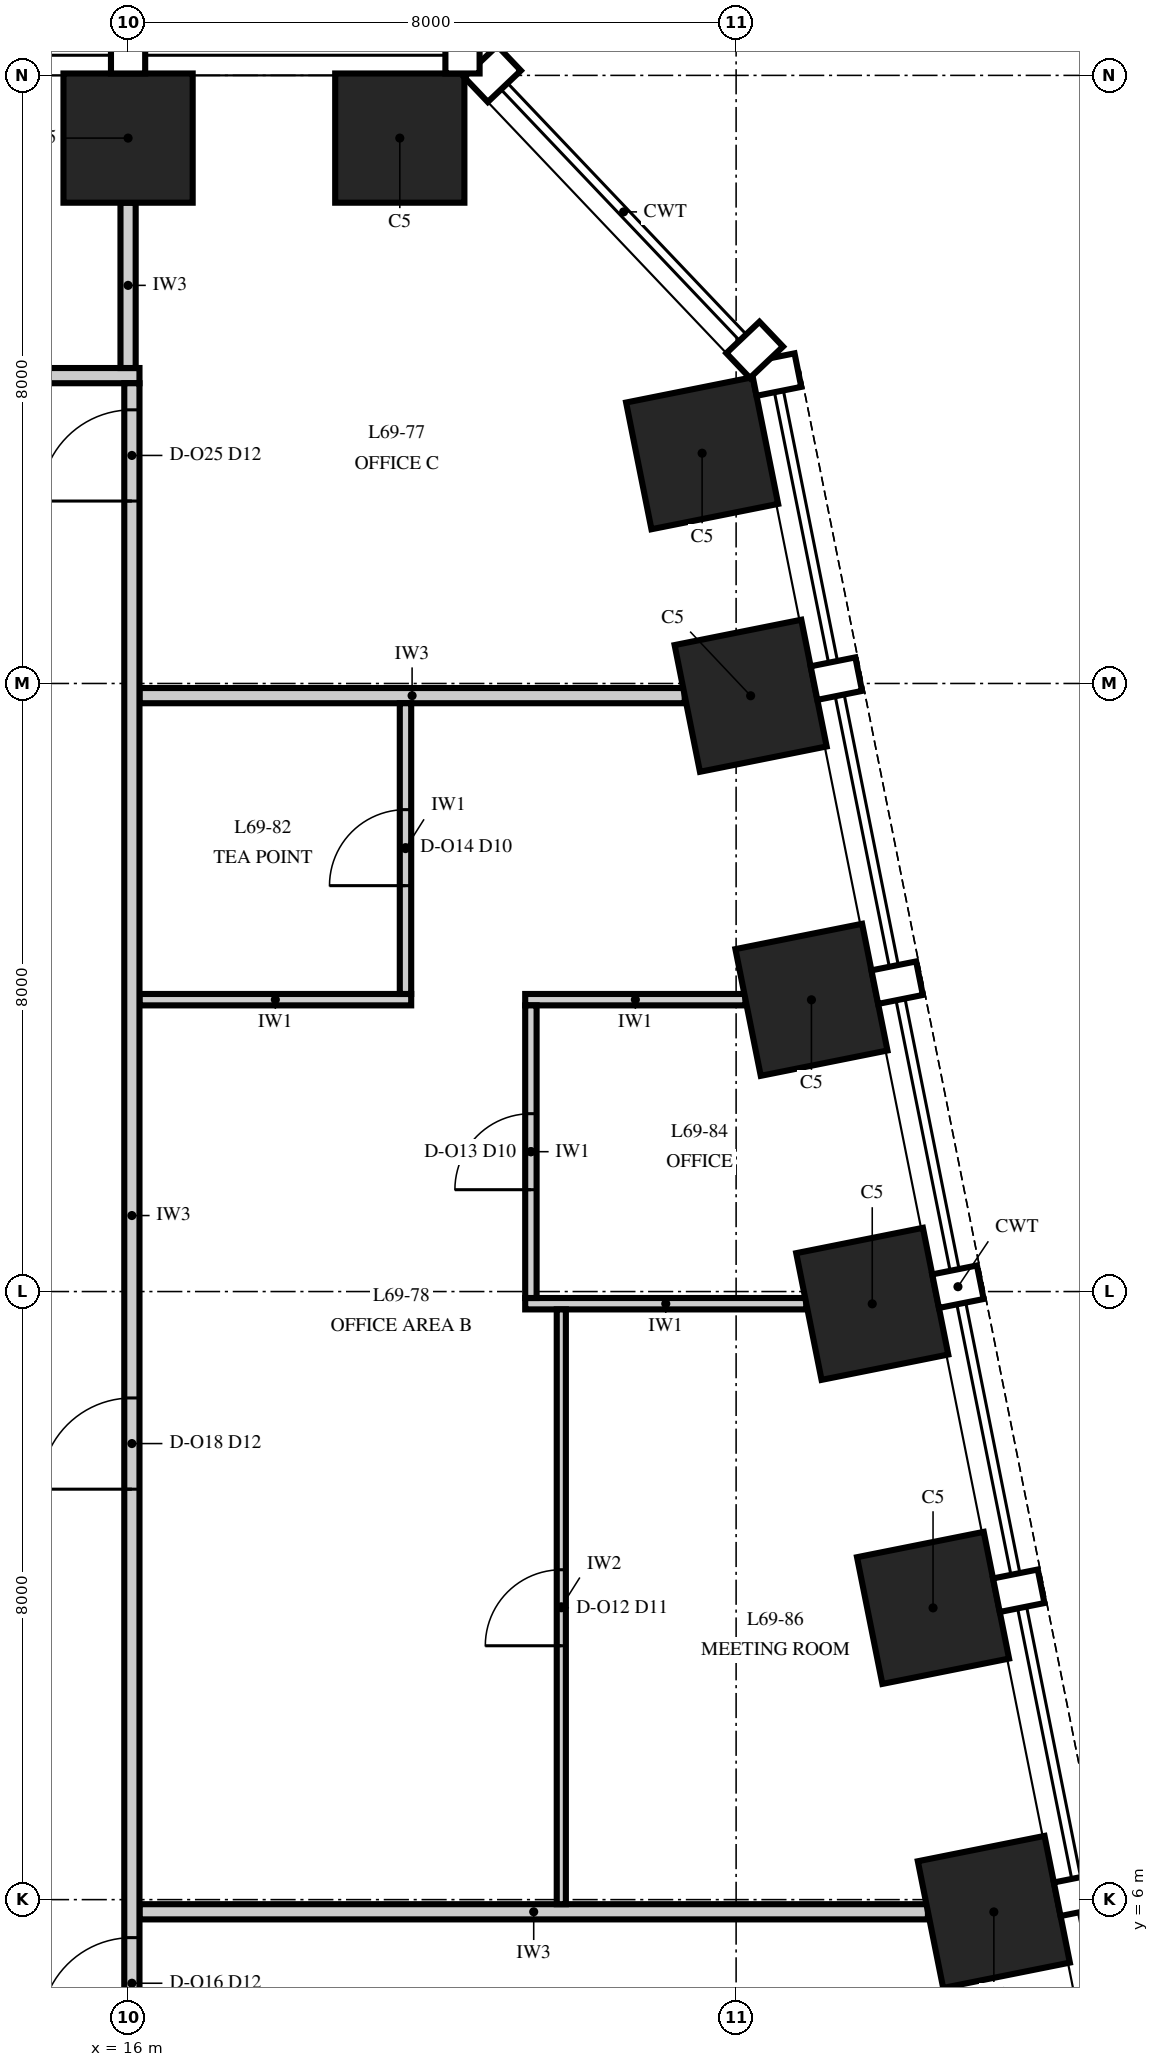
"""IFC4 building model, lengths in metres.
Left out: names, types, materials, properties, quantities, classifications, styles, units other than length and angle.
Written with IfcOpenShell. Run it as: python <this file> out.ifc"""

import sys

from ifc_helpers import new_model, si_unit, direction, frame, frame_2d, origin, origin_2d, place, context, subcontext, project, spatial, rectangle, extrude, element, fill, save


model = new_model("IFC4")
c1 = context("Model", 3, precision=1e-05, world=origin(), true_north=direction((0.0, 1.0)))
c2 = subcontext(c1, "Body", "Model", "MODEL_VIEW")
j1 = project(units=[si_unit("LENGTHUNIT", "METRE"), si_unit("PLANEANGLEUNIT", "RADIAN")], contexts=[c1])
p1 = place(None, origin())
s1 = spatial("IfcSite", under=j1, at=p1, CompositionType="ELEMENT")
p2 = place(p1, origin())
s2 = spatial("IfcBuilding", under=s1, at=p2, CompositionType="ELEMENT")
p3 = place(p2, frame((0.0, 0.0, 296.0)))
s3 = spatial("IfcBuildingStorey", under=s2, at=p3, CompositionType="ELEMENT", Elevation=296.0)
for number, where, z_axis, x_axis in (
    (1, (27.391, 5.838, 0.0), (0.0, 0.0, 1.0), (-0.196, 0.981, 0.0)),
    (2, (26.591, 9.838, 0.0), (0.0, 0.0, 1.0), (-0.196, 0.981, 0.0)),
    (3, (25.791, 13.838, 0.0), (0.0, 0.0, 1.0), (-0.196, 0.981, 0.0)),
    (4, (24.991, 17.838, 0.0), (0.0, 0.0, 1.0), (-0.196, 0.981, 0.0)),
    (5, (24.191, 21.838, 0.0), (0.0, 0.0, 1.0), (-0.196, 0.981, 0.0)),
    (6, (23.553, 25.029, 0.0), (0.0, 0.0, 1.0), (-0.196, 0.981, 0.0)),
    (7, (19.575, 29.175, 0.0), (0.0, 0.0, 1.0), (-1.0, 0.0, 0.0)),
    (8, (16.0, 29.175, 0.0), (0.0, 0.0, 1.0), (-1.0, 0.0, 0.0)),
):
    element("IfcColumn", number, at=place(p3, frame(where, z_axis=z_axis, x_axis=x_axis)), inside=s3, PredefinedType="COLUMN", context=c2, shape_type="SweptSolid", body=[
        extrude(rectangle(XDim=1.7, YDim=1.7, at=origin_2d()), origin(), (0.0, 0.0, 1.0), 4.0),
    ])
p4 = place(p3, frame((16.15, 5.84, 0.0), z_axis=(0.0, 0.0, 1.0), x_axis=(1.0, 0.0, 0.0)))
e9 = element("IfcWall", 9, at=p4, inside=s3, PredefinedType="PARTITIONING", context=c2, shape_type="SweptSolid", body=[
    extrude(rectangle(XDim=10.374, YDim=0.2, at=frame_2d((5.187, 0.0))), origin(), (0.0, 0.0, 1.0), 2.842),
])
p5 = place(p3, frame((21.225, 13.84, 0.0), z_axis=(0.0, 0.0, 1.0), x_axis=(1.0, 0.0, 0.0)))
e10 = element("IfcWall", 10, at=p5, inside=s3, PredefinedType="PARTITIONING", context=c2, shape_type="SweptSolid", body=[
    extrude(rectangle(XDim=3.699, YDim=0.15, at=frame_2d((1.849, 0.0))), origin(), (0.0, 0.0, 1.0), 3.23),
])
p6 = place(p3, frame((16.15, 17.84, 0.0), z_axis=(0.0, 0.0, 1.0), x_axis=(1.0, 0.0, 0.0)))
e11 = element("IfcWall", 11, at=p6, inside=s3, PredefinedType="PARTITIONING", context=c2, shape_type="SweptSolid", body=[
    extrude(rectangle(XDim=3.575, YDim=0.15, at=frame_2d((1.788, 0.0))), origin(), (0.0, 0.0, 1.0), 3.23),
])
p7 = place(p3, frame((21.225, 17.84, 0.0), z_axis=(0.0, 0.0, 1.0), x_axis=(1.0, 0.0, 0.0)))
e12 = element("IfcWall", 12, at=p7, inside=s3, PredefinedType="PARTITIONING", context=c2, shape_type="SweptSolid", body=[
    extrude(rectangle(XDim=2.899, YDim=0.15, at=frame_2d((1.449, 0.0))), origin(), (0.0, 0.0, 1.0), 3.23),
])
p8 = place(p3, frame((16.15, 21.84, 0.0), z_axis=(0.0, 0.0, 1.0), x_axis=(1.0, 0.0, 0.0)))
e13 = element("IfcWall", 13, at=p8, inside=s3, PredefinedType="PARTITIONING", context=c2, shape_type="SweptSolid", body=[
    extrude(rectangle(XDim=7.174, YDim=0.2, at=frame_2d((3.587, 0.0))), origin(), (0.0, 0.0, 1.0), 3.23),
])
p9 = place(p3, frame((-16.15, 26.05, 0.0), z_axis=(0.0, 0.0, 1.0), x_axis=(1.0, 0.0, 0.0)))
e14 = element("IfcWall", 14, at=p9, inside=s3, PredefinedType="PARTITIONING", context=c2, shape_type="SweptSolid", body=[
    extrude(rectangle(XDim=32.3, YDim=0.2, at=frame_2d((16.15, 0.0))), origin(), (0.0, 0.0, 1.0), 3.418),
])
p10 = place(p9, frame((3.55, 0.0, 0.0)))
e15 = element("IfcOpeningElement", 15, at=p10, cuts=e14, PredefinedType="OPENING", context=c2, shape_type="SweptSolid", body=[
    extrude(rectangle(XDim=1.2, YDim=2.4, at=frame_2d((0.6, 1.2))), frame((0.0, 0.115, 0.0), z_axis=(0.0, -1.0, 0.0), x_axis=(1.0, 0.0, 0.0)), (0.0, 0.0, 1.0), 0.23),
])
p11 = place(p9, frame((9.55, 0.0, 0.0)))
e16 = element("IfcOpeningElement", 16, at=p11, cuts=e14, PredefinedType="OPENING", context=c2, shape_type="SweptSolid", body=[
    extrude(rectangle(XDim=1.2, YDim=2.4, at=frame_2d((0.6, 1.2))), frame((0.0, 0.115, 0.0), z_axis=(0.0, -1.0, 0.0), x_axis=(1.0, 0.0, 0.0)), (0.0, 0.0, 1.0), 0.23),
])
p12 = place(p9, frame((15.55, 0.0, 0.0)))
e17 = element("IfcOpeningElement", 17, at=p12, cuts=e14, PredefinedType="OPENING", context=c2, shape_type="SweptSolid", body=[
    extrude(rectangle(XDim=1.2, YDim=2.4, at=frame_2d((0.6, 1.2))), frame((0.0, 0.115, 0.0), z_axis=(0.0, -1.0, 0.0), x_axis=(1.0, 0.0, 0.0)), (0.0, 0.0, 1.0), 0.23),
])
p13 = place(p9, frame((21.55, 0.0, 0.0)))
e18 = element("IfcOpeningElement", 18, at=p13, cuts=e14, PredefinedType="OPENING", context=c2, shape_type="SweptSolid", body=[
    extrude(rectangle(XDim=1.2, YDim=2.4, at=frame_2d((0.6, 1.2))), frame((0.0, 0.115, 0.0), z_axis=(0.0, -1.0, 0.0), x_axis=(1.0, 0.0, 0.0)), (0.0, 0.0, 1.0), 0.23),
])
p14 = place(p9, frame((27.55, 0.0, 0.0)))
e19 = element("IfcOpeningElement", 19, at=p14, cuts=e14, PredefinedType="OPENING", context=c2, shape_type="SweptSolid", body=[
    extrude(rectangle(XDim=1.2, YDim=2.4, at=frame_2d((0.6, 1.2))), frame((0.0, 0.115, 0.0), z_axis=(0.0, -1.0, 0.0), x_axis=(1.0, 0.0, 0.0)), (0.0, 0.0, 1.0), 0.23),
])
p15 = place(p3, frame((16.0, 26.15, 0.0), z_axis=(0.0, 0.0, 1.0), x_axis=(0.0, 1.0, 0.0)))
e20 = element("IfcWall", 20, at=p15, inside=s3, PredefinedType="PARTITIONING", context=c2, shape_type="SweptSolid", body=[
    extrude(rectangle(XDim=2.175, YDim=0.2, at=frame_2d((1.087, 0.0))), origin(), (0.0, 0.0, 1.0), 3.418),
])
p16 = place(p3, frame((16.05, 4.05, 0.0), z_axis=(0.0, 0.0, 1.0), x_axis=(0.0, 1.0, 0.0)))
e21 = element("IfcWall", 21, at=p16, inside=s3, PredefinedType="PARTITIONING", context=c2, shape_type="SweptSolid", body=[
    extrude(rectangle(XDim=21.9, YDim=0.2, at=frame_2d((10.95, 0.0))), origin(), (0.0, 0.0, 1.0), 2.842),
])
p17 = place(p16, frame((0.25, 0.0, 0.0)))
e22 = element("IfcOpeningElement", 22, at=p17, cuts=e21, PredefinedType="OPENING", context=c2, shape_type="SweptSolid", body=[
    extrude(rectangle(XDim=1.2, YDim=2.4, at=frame_2d((0.6, 1.2))), frame((0.0, 0.115, 0.0), z_axis=(0.0, -1.0, 0.0), x_axis=(1.0, 0.0, 0.0)), (0.0, 0.0, 1.0), 0.23),
])
p18 = place(p16, frame((7.35, 0.0, 0.0)))
e23 = element("IfcOpeningElement", 23, at=p18, cuts=e21, PredefinedType="OPENING", context=c2, shape_type="SweptSolid", body=[
    extrude(rectangle(XDim=1.2, YDim=2.4, at=frame_2d((0.6, 1.2))), frame((0.0, 0.115, 0.0), z_axis=(0.0, -1.0, 0.0), x_axis=(1.0, 0.0, 0.0)), (0.0, 0.0, 1.0), 0.23),
])
p19 = place(p16, frame((20.35, 0.0, 0.0)))
e24 = element("IfcOpeningElement", 24, at=p19, cuts=e21, PredefinedType="OPENING", context=c2, shape_type="SweptSolid", body=[
    extrude(rectangle(XDim=1.2, YDim=2.4, at=frame_2d((0.6, 1.2))), frame((0.0, 0.115, 0.0), z_axis=(0.0, -1.0, 0.0), x_axis=(1.0, 0.0, 0.0)), (0.0, 0.0, 1.0), 0.23),
])
p20 = place(p3, frame((19.65, 17.915, 0.0), z_axis=(0.0, 0.0, 1.0), x_axis=(0.0, 1.0, 0.0)))
e25 = element("IfcWall", 25, at=p20, inside=s3, PredefinedType="PARTITIONING", context=c2, shape_type="SweptSolid", body=[
    extrude(rectangle(XDim=3.825, YDim=0.15, at=frame_2d((1.913, 0.0))), origin(), (0.0, 0.0, 1.0), 3.23),
])
p21 = place(p20, frame((1.425, 0.0, 0.0)))
e26 = element("IfcOpeningElement", 26, at=p21, cuts=e25, PredefinedType="OPENING", context=c2, shape_type="SweptSolid", body=[
    extrude(rectangle(XDim=1.0, YDim=2.3, at=frame_2d((0.5, 1.15))), frame((0.0, 0.09, 0.0), z_axis=(0.0, -1.0, 0.0), x_axis=(1.0, 0.0, 0.0)), (0.0, 0.0, 1.0), 0.18),
])
p22 = place(p3, frame((21.3, 13.915, 0.0), z_axis=(0.0, 0.0, 1.0), x_axis=(0.0, 1.0, 0.0)))
e27 = element("IfcWall", 27, at=p22, inside=s3, PredefinedType="PARTITIONING", context=c2, shape_type="SweptSolid", body=[
    extrude(rectangle(XDim=3.85, YDim=0.15, at=frame_2d((1.925, 0.0))), origin(), (0.0, 0.0, 1.0), 3.23),
])
p23 = place(p22, frame((1.425, 0.0, 0.0)))
e28 = element("IfcOpeningElement", 28, at=p23, cuts=e27, PredefinedType="OPENING", context=c2, shape_type="SweptSolid", body=[
    extrude(rectangle(XDim=1.0, YDim=2.3, at=frame_2d((0.5, 1.15))), frame((0.0, 0.09, 0.0), z_axis=(0.0, -1.0, 0.0), x_axis=(1.0, 0.0, 0.0)), (0.0, 0.0, 1.0), 0.18),
])
p24 = place(p3, frame((21.7, 5.94, 0.0), z_axis=(0.0, 0.0, 1.0), x_axis=(0.0, 1.0, 0.0)))
e29 = element("IfcWall", 29, at=p24, inside=s3, PredefinedType="PARTITIONING", context=c2, shape_type="SweptSolid", body=[
    extrude(rectangle(XDim=7.825, YDim=0.12, at=frame_2d((3.913, 0.0))), origin(), (0.0, 0.0, 1.0), 2.842),
])
p25 = place(p24, frame((3.4, 0.0, 0.0)))
e30 = element("IfcOpeningElement", 30, at=p25, cuts=e29, PredefinedType="OPENING", context=c2, shape_type="SweptSolid", body=[
    extrude(rectangle(XDim=1.0, YDim=2.4, at=frame_2d((0.5, 1.2))), frame((0.0, 0.075, 0.0), z_axis=(0.0, -1.0, 0.0), x_axis=(1.0, 0.0, 0.0)), (0.0, 0.0, 1.0), 0.15),
])
p26 = place(p25, origin())
e31 = element("IfcDoor", 31, at=p26, inside=s3, OperationType="SINGLE_SWING_RIGHT", PredefinedType="DOOR", context=c2, shape_type="SweptSolid", body=[
    extrude(rectangle(XDim=1.0, YDim=2.4, at=frame_2d((0.5, 1.2))), frame((0.0, 0.06, 0.0), z_axis=(0.0, -1.0, 0.0), x_axis=(1.0, 0.0, 0.0)), (0.0, 0.0, 1.0), 0.12),
])
fill(e30, e31)
p27 = place(p23, origin())
e32 = element("IfcDoor", 32, at=p27, inside=s3, OperationType="SINGLE_SWING_LEFT", PredefinedType="DOOR", context=c2, shape_type="SweptSolid", body=[
    extrude(rectangle(XDim=1.0, YDim=2.3, at=frame_2d((0.5, 1.15))), frame((0.0, 0.075, 0.0), z_axis=(0.0, -1.0, 0.0), x_axis=(1.0, 0.0, 0.0)), (0.0, 0.0, 1.0), 0.149),
])
fill(e28, e32)
p28 = place(p21, origin())
e33 = element("IfcDoor", 33, at=p28, inside=s3, OperationType="SINGLE_SWING_LEFT", PredefinedType="DOOR", context=c2, shape_type="SweptSolid", body=[
    extrude(rectangle(XDim=1.0, YDim=2.3, at=frame_2d((0.5, 1.15))), frame((0.0, 0.075, 0.0), z_axis=(0.0, -1.0, 0.0), x_axis=(1.0, 0.0, 0.0)), (0.0, 0.0, 1.0), 0.149),
])
fill(e26, e33)
p29 = place(p17, origin())
e34 = element("IfcDoor", 34, at=p29, inside=s3, OperationType="SINGLE_SWING_LEFT", PredefinedType="DOOR", context=c2, shape_type="SweptSolid", body=[
    extrude(rectangle(XDim=1.2, YDim=2.4, at=frame_2d((0.6, 1.2))), frame((0.0, 0.1, 0.0), z_axis=(0.0, -1.0, 0.0), x_axis=(1.0, 0.0, 0.0)), (0.0, 0.0, 1.0), 0.199),
])
fill(e22, e34)
p30 = place(p18, origin())
e35 = element("IfcDoor", 35, at=p30, inside=s3, OperationType="SINGLE_SWING_LEFT", PredefinedType="DOOR", context=c2, shape_type="SweptSolid", body=[
    extrude(rectangle(XDim=1.2, YDim=2.4, at=frame_2d((0.6, 1.2))), frame((0.0, 0.1, 0.0), z_axis=(0.0, -1.0, 0.0), x_axis=(1.0, 0.0, 0.0)), (0.0, 0.0, 1.0), 0.199),
])
fill(e23, e35)
p31 = place(p19, origin())
e36 = element("IfcDoor", 36, at=p31, inside=s3, OperationType="SINGLE_SWING_LEFT", PredefinedType="DOOR", context=c2, shape_type="SweptSolid", body=[
    extrude(rectangle(XDim=1.2, YDim=2.4, at=frame_2d((0.6, 1.2))), frame((0.0, 0.1, 0.0), z_axis=(0.0, -1.0, 0.0), x_axis=(1.0, 0.0, 0.0)), (0.0, 0.0, 1.0), 0.199),
])
fill(e24, e36)
save(model, sys.argv[1])
